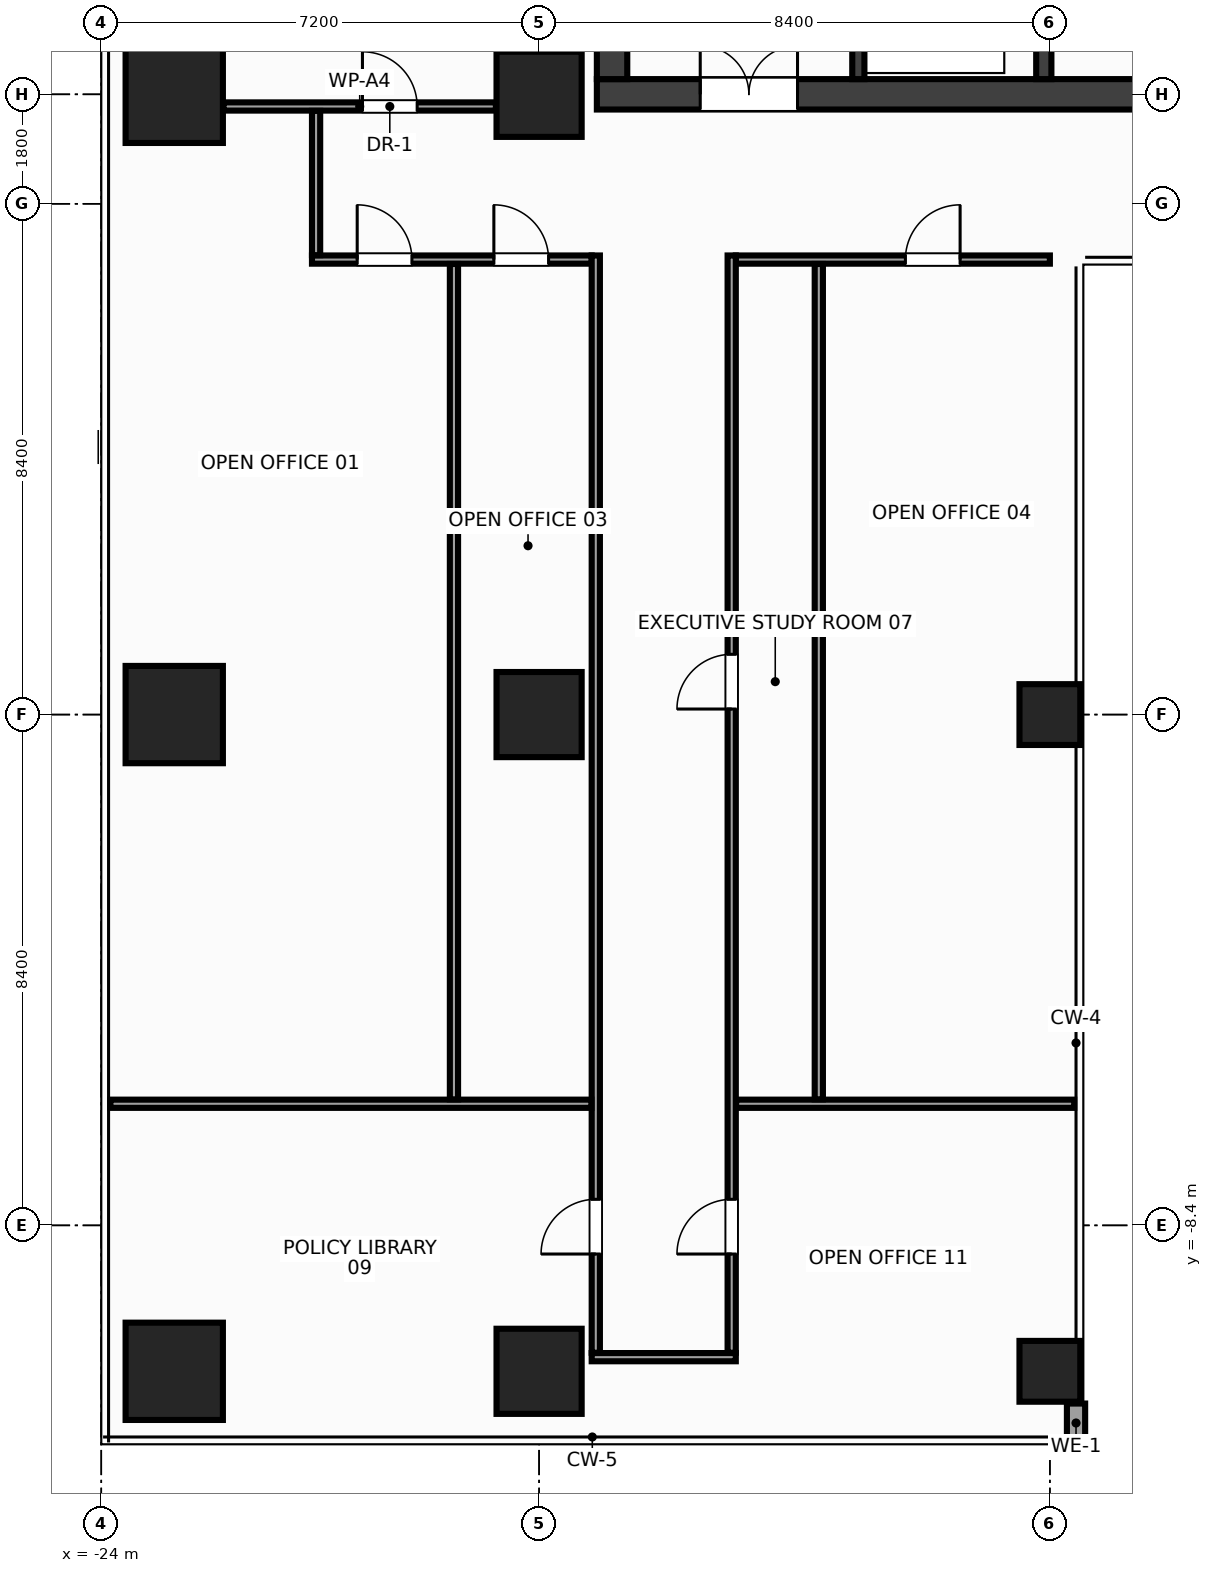
"""IFC4 building model, lengths in metres.
Left out: names, types, materials, properties, quantities, classifications, styles, units other than length and angle.
Written with IfcOpenShell. Run it as: python <this file> out.ifc"""

import sys

from ifc_helpers import new_model, si_unit, direction, frame, frame_2d, origin, origin_2d, place, context, subcontext, project, spatial, rectangle, hollow_rectangle, extrude, source, transform, mapped, element, fill, save


model = new_model("IFC4")
c1 = context("Model", 3, precision=1e-05, world=origin(), true_north=direction((0.0, 1.0)))
c2 = subcontext(c1, "Body", "Model", "MODEL_VIEW")
j1 = project(units=[si_unit("LENGTHUNIT", "METRE"), si_unit("PLANEANGLEUNIT", "RADIAN")], contexts=[c1])
p1 = place(None, origin())
s1 = spatial("IfcSite", under=j1, at=p1, CompositionType="ELEMENT")
p2 = place(p1, origin())
s2 = spatial("IfcBuilding", under=s1, at=p2, CompositionType="ELEMENT")
p3 = place(p2, frame((0.0, 0.0, 203.6)))
s3 = spatial("IfcBuildingStorey", under=s2, at=p3, CompositionType="ELEMENT", Elevation=203.6)
m1 = source(origin(), c2, "Body", "SweptSolid", [
    extrude(rectangle(XDim=31.7, YDim=0.5, at=frame_2d((15.85, 0.0))), origin(), (0.0, 0.0, 1.0), 3.6),
])
p4 = place(p3, frame((-15.85, 10.2, 0.0), z_axis=(0.0, 0.0, 1.0), x_axis=(1.0, 0.0, 0.0)))
e1 = element("IfcWall", 1, at=p4, inside=s3, PredefinedType="SHEAR", context=c2, shape_type="MappedRepresentation", body=[
    mapped(m1, transform((0.0, 0.0, 0.0), x_axis=(1.0, 0.0, 0.0), y_axis=(0.0, 1.0, 0.0), z_axis=(0.0, 0.0, 1.0), scale=1.0)),
])
p5 = place(p4, frame((1.7, 0.0, 0.0)))
e2 = element("IfcOpeningElement", 2, at=p5, cuts=e1, PredefinedType="OPENING", context=c2, shape_type="SweptSolid", body=[
    extrude(rectangle(XDim=1.6, YDim=2.15, at=frame_2d((0.8, 1.075))), frame((0.0, 0.262, 0.0), z_axis=(0.0, -1.0, 0.0), x_axis=(1.0, 0.0, 0.0)), (0.0, 0.0, 1.0), 0.524),
])
p6 = place(p4, frame((28.4, 0.0, 0.0)))
e3 = element("IfcOpeningElement", 3, at=p6, cuts=e1, PredefinedType="OPENING", context=c2, shape_type="SweptSolid", body=[
    extrude(rectangle(XDim=1.6, YDim=2.15, at=frame_2d((0.8, 1.075))), frame((0.0, 0.262, 0.0), z_axis=(0.0, -1.0, 0.0), x_axis=(1.0, 0.0, 0.0)), (0.0, 0.0, 1.0), 0.524),
])
p7 = place(p4, frame((15.1, 0.0, 0.0)))
e4 = element("IfcOpeningElement", 4, at=p7, cuts=e1, PredefinedType="OPENING", context=c2, shape_type="SweptSolid", body=[
    extrude(rectangle(XDim=1.5, YDim=2.2, at=frame_2d((0.75, 1.1))), frame((0.0, 0.262, 0.0), z_axis=(0.0, -1.0, 0.0), x_axis=(1.0, 0.0, 0.0)), (0.0, 0.0, 1.0), 0.524),
])
m2 = source(origin(), c2, "Body", "SweptSolid", [
    extrude(rectangle(XDim=13.1, YDim=0.5, at=frame_2d((6.55, 0.0))), origin(), (0.0, 0.0, 1.0), 3.6),
])
p8 = place(p3, frame((-15.6, 10.45, 0.0), z_axis=(0.0, 0.0, 1.0), x_axis=(0.0, 1.0, 0.0)))
e5 = element("IfcWall", 5, at=p8, inside=s3, PredefinedType="SHEAR", context=c2, shape_type="MappedRepresentation", body=[
    mapped(m2, transform((0.0, 0.0, 0.0), x_axis=(1.0, 0.0, 0.0), y_axis=(0.0, 1.0, 0.0), z_axis=(0.0, 0.0, 1.0), scale=1.0)),
])
m3 = source(origin(), c2, "Body", "SweptSolid", [
    extrude(rectangle(XDim=13.1, YDim=0.25, at=frame_2d((6.55, 0.0))), origin(), (0.0, 0.0, 1.0), 3.6),
])
p9 = place(p3, frame((-8.5, 10.45, 0.0), z_axis=(0.0, 0.0, 1.0), x_axis=(0.0, 1.0, 0.0)))
e6 = element("IfcWall", 6, at=p9, inside=s3, PredefinedType="SHEAR", context=c2, shape_type="MappedRepresentation", body=[
    mapped(m3, transform((0.0, 0.0, 0.0), x_axis=(1.0, 0.0, 0.0), y_axis=(0.0, 1.0, 0.0), z_axis=(0.0, 0.0, 1.0), scale=1.0)),
])
p10 = place(p9, frame((4.22, 0.0, 0.0)))
e7 = element("IfcOpeningElement", 7, at=p10, cuts=e6, PredefinedType="OPENING", context=c2, shape_type="SweptSolid", body=[
    extrude(rectangle(XDim=1.1, YDim=2.15, at=frame_2d((0.55, 1.075))), frame((0.0, 0.137, 0.0), z_axis=(0.0, -1.0, 0.0), x_axis=(1.0, 0.0, 0.0)), (0.0, 0.0, 1.0), 0.274),
])
p11 = place(p9, frame((6.14, 0.0, 0.0)))
e8 = element("IfcOpeningElement", 8, at=p11, cuts=e6, PredefinedType="OPENING", context=c2, shape_type="SweptSolid", body=[
    extrude(rectangle(XDim=1.1, YDim=2.15, at=frame_2d((0.55, 1.075))), frame((0.0, 0.137, 0.0), z_axis=(0.0, -1.0, 0.0), x_axis=(1.0, 0.0, 0.0)), (0.0, 0.0, 1.0), 0.274),
])
p12 = place(p9, frame((8.06, 0.0, 0.0)))
e9 = element("IfcOpeningElement", 9, at=p12, cuts=e6, PredefinedType="OPENING", context=c2, shape_type="SweptSolid", body=[
    extrude(rectangle(XDim=1.1, YDim=2.15, at=frame_2d((0.55, 1.075))), frame((0.0, 0.137, 0.0), z_axis=(0.0, -1.0, 0.0), x_axis=(1.0, 0.0, 0.0)), (0.0, 0.0, 1.0), 0.274),
])
m4 = source(origin(), c2, "Body", "SweptSolid", [
    extrude(rectangle(XDim=3.2, YDim=0.2, at=frame_2d((1.6, 0.0))), origin(), (0.0, 0.0, 1.0), 3.6),
])
p13 = place(p3, frame((-11.55, 10.45, 0.0), z_axis=(0.0, 0.0, 1.0), x_axis=(0.0, 1.0, 0.0)))
e10 = element("IfcWall", 10, at=p13, inside=s3, PredefinedType="SHEAR", context=c2, shape_type="MappedRepresentation", body=[
    mapped(m4, transform((0.0, 0.0, 0.0), x_axis=(1.0, 0.0, 0.0), y_axis=(0.0, 1.0, 0.0), z_axis=(0.0, 0.0, 1.0), scale=1.0)),
])
p14 = place(p13, frame((0.9, 0.0, 0.0)))
e11 = element("IfcOpeningElement", 11, at=p14, cuts=e10, PredefinedType="OPENING", context=c2, shape_type="SweptSolid", body=[
    extrude(rectangle(XDim=1.1, YDim=2.15, at=frame_2d((0.55, 1.075))), frame((0.0, 0.112, 0.0), z_axis=(0.0, -1.0, 0.0), x_axis=(1.0, 0.0, 0.0)), (0.0, 0.0, 1.0), 0.224),
])
m5 = source(origin(), c2, "Body", "SweptSolid", [
    extrude(rectangle(XDim=1.4, YDim=1.4, at=origin_2d()), origin(), (0.0, 0.0, 1.0), 3.6),
])
for number, where, z_axis, x_axis in (
    (12, (-16.8, -10.8, 0.0), (0.0, 0.0, 1.0), (1.0, 0.0, 0.0)),
    (13, (-16.8, 0.0, 0.0), (0.0, 0.0, 1.0), (1.0, 0.0, 0.0)),
    (14, (-16.8, 10.2, 0.0), (0.0, 0.0, 1.0), (1.0, 0.0, 0.0)),
):
    element("IfcColumn", number, at=place(p3, frame(where, z_axis=z_axis, x_axis=x_axis)), inside=s3, PredefinedType="COLUMN", context=c2, shape_type="MappedRepresentation", body=[
        mapped(m5, transform((0.0, 0.0, 0.0), x_axis=(1.0, 0.0, 0.0), y_axis=(0.0, 1.0, 0.0), z_axis=(0.0, 0.0, 1.0), scale=1.0)),
    ])
m6 = source(origin(), c2, "Body", "SweptSolid", [
    extrude(rectangle(XDim=1.6, YDim=1.6, at=origin_2d()), origin(), (0.0, 0.0, 1.0), 3.6),
])
for number, where, z_axis, x_axis in (
    (15, (-22.8, -10.8, 0.0), (0.0, 0.0, 1.0), (1.0, 0.0, 0.0)),
    (16, (-22.8, 0.0, 0.0), (0.0, 0.0, 1.0), (1.0, 0.0, 0.0)),
    (17, (-22.8, 10.2, 0.0), (0.0, 0.0, 1.0), (1.0, 0.0, 0.0)),
):
    element("IfcColumn", number, at=place(p3, frame(where, z_axis=z_axis, x_axis=x_axis)), inside=s3, PredefinedType="COLUMN", context=c2, shape_type="MappedRepresentation", body=[
        mapped(m6, transform((0.0, 0.0, 0.0), x_axis=(1.0, 0.0, 0.0), y_axis=(0.0, 1.0, 0.0), z_axis=(0.0, 0.0, 1.0), scale=1.0)),
    ])
m7 = source(origin(), c2, "Body", "SweptSolid", [
    extrude(hollow_rectangle(XDim=1.0, YDim=1.0, WallThickness=0.045, at=origin_2d()), origin(), (0.0, 0.0, 1.0), 3.6),
])
for number, where, z_axis, x_axis in (
    (18, (-8.4, 0.0, 0.0), (0.0, 0.0, 1.0), (1.0, 0.0, 0.0)),
    (19, (-8.4, -10.8, 0.0), (0.0, 0.0, 1.0), (1.0, 0.0, 0.0)),
):
    element("IfcColumn", number, at=place(p3, frame(where, z_axis=z_axis, x_axis=x_axis)), inside=s3, PredefinedType="COLUMN", context=c2, shape_type="MappedRepresentation", body=[
        mapped(m7, transform((0.0, 0.0, 0.0), x_axis=(1.0, 0.0, 0.0), y_axis=(0.0, 1.0, 0.0), z_axis=(0.0, 0.0, 1.0), scale=1.0)),
    ])
m8 = source(origin(), c2, "Body", "SweptSolid", [
    extrude(rectangle(XDim=0.64, YDim=0.24, at=frame_2d((0.32, 0.0))), origin(), (0.0, 0.0, 1.0), 2.76),
])
p15 = place(p3, frame((-7.97, -11.97, 0.0), z_axis=(0.0, 0.0, 1.0), x_axis=(0.0, 1.0, 0.0)))
e20 = element("IfcWall", 20, at=p15, inside=s3, PredefinedType="STANDARD", context=c2, shape_type="MappedRepresentation", body=[
    mapped(m8, transform((0.0, 0.0, 0.0), x_axis=(1.0, 0.0, 0.0), y_axis=(0.0, 1.0, 0.0), z_axis=(0.0, 0.0, 1.0), scale=1.0)),
])
m9 = source(origin(), c2, "Body", "SweptSolid", [
    extrude(rectangle(XDim=4.48, YDim=0.135, at=frame_2d((2.24, 0.0))), origin(), (0.0, 0.0, 1.0), 2.915),
])
p16 = place(p3, frame((-21.99, 10.0, 0.0), z_axis=(0.0, 0.0, 1.0), x_axis=(1.0, 0.0, 0.0)))
e21 = element("IfcWall", 21, at=p16, inside=s3, PredefinedType="PARTITIONING", context=c2, shape_type="MappedRepresentation", body=[
    mapped(m9, transform((0.0, 0.0, 0.0), x_axis=(1.0, 0.0, 0.0), y_axis=(0.0, 1.0, 0.0), z_axis=(0.0, 0.0, 1.0), scale=1.0)),
])
p17 = place(p16, frame((2.285, 0.0, 0.0)))
e22 = element("IfcOpeningElement", 22, at=p17, cuts=e21, PredefinedType="OPENING", context=c2, shape_type="SweptSolid", body=[
    extrude(rectangle(XDim=0.9, YDim=2.15, at=frame_2d((0.45, 1.075))), frame((0.0, 0.08, 0.0), z_axis=(0.0, -1.0, 0.0), x_axis=(1.0, 0.0, 0.0)), (0.0, 0.0, 1.0), 0.159),
])
m10 = source(origin(), c2, "Body", "SweptSolid", [
    extrude(rectangle(XDim=4.6, YDim=0.135, at=frame_2d((2.3, 0.0))), origin(), (0.0, 0.0, 1.0), 2.765),
])
p18 = place(p3, frame((-20.535, 7.482, 0.0), z_axis=(0.0, 0.0, 1.0), x_axis=(1.0, 0.0, 0.0)))
e23 = element("IfcWall", 23, at=p18, inside=s3, PredefinedType="PARTITIONING", context=c2, shape_type="MappedRepresentation", body=[
    mapped(m10, transform((0.0, 0.0, 0.0), x_axis=(1.0, 0.0, 0.0), y_axis=(0.0, 1.0, 0.0), z_axis=(0.0, 0.0, 1.0), scale=1.0)),
])
p19 = place(p18, frame((0.744, 0.0, 0.0)))
e24 = element("IfcOpeningElement", 24, at=p19, cuts=e23, PredefinedType="OPENING", context=c2, shape_type="SweptSolid", body=[
    extrude(rectangle(XDim=0.9, YDim=2.15, at=frame_2d((0.45, 1.075))), frame((0.0, 0.08, 0.0), z_axis=(0.0, -1.0, 0.0), x_axis=(1.0, 0.0, 0.0)), (0.0, 0.0, 1.0), 0.159),
])
p20 = place(p18, frame((2.991, 0.0, 0.0)))
e25 = element("IfcOpeningElement", 25, at=p20, cuts=e23, PredefinedType="OPENING", context=c2, shape_type="SweptSolid", body=[
    extrude(rectangle(XDim=0.9, YDim=2.15, at=frame_2d((0.45, 1.075))), frame((0.0, 0.08, 0.0), z_axis=(0.0, -1.0, 0.0), x_axis=(1.0, 0.0, 0.0)), (0.0, 0.0, 1.0), 0.159),
])
m11 = source(origin(), c2, "Body", "SweptSolid", [
    extrude(rectangle(XDim=5.165, YDim=0.135, at=frame_2d((2.583, 0.0))), origin(), (0.0, 0.0, 1.0), 3.38),
])
p21 = place(p3, frame((-13.565, 7.482, 0.0), z_axis=(0.0, 0.0, 1.0), x_axis=(1.0, 0.0, 0.0)))
e26 = element("IfcWall", 26, at=p21, inside=s3, PredefinedType="PARTITIONING", context=c2, shape_type="MappedRepresentation", body=[
    mapped(m11, transform((0.0, 0.0, 0.0), x_axis=(1.0, 0.0, 0.0), y_axis=(0.0, 1.0, 0.0), z_axis=(0.0, 0.0, 1.0), scale=1.0)),
])
p22 = place(p21, frame((2.789, 0.0, 0.0)))
e27 = element("IfcOpeningElement", 27, at=p22, cuts=e26, PredefinedType="OPENING", context=c2, shape_type="SweptSolid", body=[
    extrude(rectangle(XDim=0.9, YDim=2.15, at=frame_2d((0.45, 1.075))), frame((0.0, 0.08, 0.0), z_axis=(0.0, -1.0, 0.0), x_axis=(1.0, 0.0, 0.0)), (0.0, 0.0, 1.0), 0.159),
])
m12 = source(origin(), c2, "Body", "SweptSolid", [
    extrude(rectangle(XDim=2.37, YDim=0.135, at=frame_2d((1.185, 0.0))), origin(), (0.0, 0.0, 1.0), 3.38),
])
p23 = place(p3, frame((-15.935, -10.567, 0.0), z_axis=(0.0, 0.0, 1.0), x_axis=(1.0, 0.0, 0.0)))
e28 = element("IfcWall", 28, at=p23, inside=s3, PredefinedType="PARTITIONING", context=c2, shape_type="MappedRepresentation", body=[
    mapped(m12, transform((0.0, 0.0, 0.0), x_axis=(1.0, 0.0, 0.0), y_axis=(0.0, 1.0, 0.0), z_axis=(0.0, 0.0, 1.0), scale=1.0)),
])
m13 = source(origin(), c2, "Body", "SweptSolid", [
    extrude(rectangle(XDim=2.373, YDim=0.135, at=frame_2d((1.186, 0.0))), origin(), (0.0, 0.0, 1.0), 3.38),
])
p24 = place(p3, frame((-20.468, 7.555, 0.0), z_axis=(0.0, 0.0, 1.0), x_axis=(0.0, 1.0, 0.0)))
e29 = element("IfcWall", 29, at=p24, inside=s3, PredefinedType="PARTITIONING", context=c2, shape_type="MappedRepresentation", body=[
    mapped(m13, transform((0.0, 0.0, 0.0), x_axis=(1.0, 0.0, 0.0), y_axis=(0.0, 1.0, 0.0), z_axis=(0.0, 0.0, 1.0), scale=1.0)),
])
m14 = source(origin(), c2, "Body", "SweptSolid", [
    extrude(rectangle(XDim=18.045, YDim=0.135, at=frame_2d((9.022, 0.0))), origin(), (0.0, 0.0, 1.0), 2.915),
])
p25 = place(p3, frame((-15.867, -10.495, 0.0), z_axis=(0.0, 0.0, 1.0), x_axis=(0.0, 1.0, 0.0)))
e30 = element("IfcWall", 30, at=p25, inside=s3, PredefinedType="PARTITIONING", context=c2, shape_type="MappedRepresentation", body=[
    mapped(m14, transform((0.0, 0.0, 0.0), x_axis=(1.0, 0.0, 0.0), y_axis=(0.0, 1.0, 0.0), z_axis=(0.0, 0.0, 1.0), scale=1.0)),
])
p26 = place(p25, frame((1.624, 0.0, 0.0)))
e31 = element("IfcOpeningElement", 31, at=p26, cuts=e30, PredefinedType="OPENING", context=c2, shape_type="SweptSolid", body=[
    extrude(rectangle(XDim=0.9, YDim=2.15, at=frame_2d((0.45, 1.075))), frame((0.0, 0.08, 0.0), z_axis=(0.0, -1.0, 0.0), x_axis=(1.0, 0.0, 0.0)), (0.0, 0.0, 1.0), 0.159),
])
p27 = place(p3, frame((-13.633, -10.495, 0.0), z_axis=(0.0, 0.0, 1.0), x_axis=(0.0, 1.0, 0.0)))
e32 = element("IfcWall", 32, at=p27, inside=s3, PredefinedType="PARTITIONING", context=c2, shape_type="MappedRepresentation", body=[
    mapped(m14, transform((0.0, 0.0, 0.0), x_axis=(1.0, 0.0, 0.0), y_axis=(0.0, 1.0, 0.0), z_axis=(0.0, 0.0, 1.0), scale=1.0)),
])
p28 = place(p27, frame((10.586, 0.0, 0.0)))
e33 = element("IfcOpeningElement", 33, at=p28, cuts=e32, PredefinedType="OPENING", context=c2, shape_type="SweptSolid", body=[
    extrude(rectangle(XDim=0.9, YDim=2.15, at=frame_2d((0.45, 1.075))), frame((0.0, 0.08, 0.0), z_axis=(0.0, -1.0, 0.0), x_axis=(1.0, 0.0, 0.0)), (0.0, 0.0, 1.0), 0.159),
])
p29 = place(p27, frame((1.624, 0.0, 0.0)))
e34 = element("IfcOpeningElement", 34, at=p29, cuts=e32, PredefinedType="OPENING", context=c2, shape_type="SweptSolid", body=[
    extrude(rectangle(XDim=0.9, YDim=2.15, at=frame_2d((0.45, 1.075))), frame((0.0, 0.08, 0.0), z_axis=(0.0, -1.0, 0.0), x_axis=(1.0, 0.0, 0.0)), (0.0, 0.0, 1.0), 0.159),
])
m15 = source(origin(), c2, "Body", "SweptSolid", [
    extrude(rectangle(XDim=7.91, YDim=0.135, at=frame_2d((3.955, 0.0))), origin(), (0.0, 0.0, 1.0), 2.765),
])
p30 = place(p3, frame((-23.85, -6.4, 0.0), z_axis=(0.0, 0.0, 1.0), x_axis=(1.0, 0.0, 0.0)))
e35 = element("IfcWall", 35, at=p30, inside=s3, PredefinedType="PARTITIONING", context=c2, shape_type="MappedRepresentation", body=[
    mapped(m15, transform((0.0, 0.0, 0.0), x_axis=(1.0, 0.0, 0.0), y_axis=(0.0, 1.0, 0.0), z_axis=(0.0, 0.0, 1.0), scale=1.0)),
])
m16 = source(origin(), c2, "Body", "SweptSolid", [
    extrude(rectangle(XDim=5.56, YDim=0.135, at=frame_2d((2.78, 0.0))), origin(), (0.0, 0.0, 1.0), 2.765),
])
p31 = place(p3, frame((-13.56, -6.4, 0.0), z_axis=(0.0, 0.0, 1.0), x_axis=(1.0, 0.0, 0.0)))
e36 = element("IfcWall", 36, at=p31, inside=s3, PredefinedType="PARTITIONING", context=c2, shape_type="MappedRepresentation", body=[
    mapped(m16, transform((0.0, 0.0, 0.0), x_axis=(1.0, 0.0, 0.0), y_axis=(0.0, 1.0, 0.0), z_axis=(0.0, 0.0, 1.0), scale=1.0)),
])
m17 = source(origin(), c2, "Body", "SweptSolid", [
    extrude(rectangle(XDim=13.737, YDim=0.135, at=frame_2d((6.869, 0.0))), origin(), (0.0, 0.0, 1.0), 2.915),
])
for number, where, z_axis, x_axis in (
    (37, (-18.2, -6.327, 0.0), (0.0, 0.0, 1.0), (0.0, 1.0, 0.0)),
    (38, (-12.2, -6.327, 0.0), (0.0, 0.0, 1.0), (0.0, 1.0, 0.0)),
):
    element("IfcWall", number, at=place(p3, frame(where, z_axis=z_axis, x_axis=x_axis)), inside=s3, PredefinedType="PARTITIONING", context=c2, shape_type="MappedRepresentation", body=[
        mapped(m17, transform((0.0, 0.0, 0.0), x_axis=(1.0, 0.0, 0.0), y_axis=(0.0, 1.0, 0.0), z_axis=(0.0, 0.0, 1.0), scale=1.0)),
    ])
m18 = source(origin(), c2, "Body", "SweptSolid", [
    extrude(rectangle(XDim=1.6, YDim=2.15, at=frame_2d((0.8, 1.075))), frame((0.0, 0.025, 0.0), z_axis=(0.0, -1.0, 0.0), x_axis=(1.0, 0.0, 0.0)), (0.0, 0.0, 1.0), 0.05),
])
p32 = place(p5, origin())
e39 = element("IfcDoor", 39, at=p32, inside=s3, OperationType="DOUBLE_DOOR_SINGLE_SWING", PredefinedType="DOOR", context=c2, shape_type="MappedRepresentation", body=[
    mapped(m18, transform((0.0, 0.0, 0.0), x_axis=(1.0, 0.0, 0.0), y_axis=(0.0, 1.0, 0.0), z_axis=(0.0, 0.0, 1.0), scale=1.0)),
])
fill(e2, e39)
m19 = source(origin(), c2, "Body", "SweptSolid", [
    extrude(rectangle(XDim=0.9, YDim=2.15, at=frame_2d((0.45, 1.075))), frame((0.0, 0.025, 0.0), z_axis=(0.0, -1.0, 0.0), x_axis=(1.0, 0.0, 0.0)), (0.0, 0.0, 1.0), 0.05),
])
p33 = place(p17, origin())
e40 = element("IfcDoor", 40, at=p33, inside=s3, OperationType="SINGLE_SWING_LEFT", PredefinedType="DOOR", context=c2, shape_type="MappedRepresentation", body=[
    mapped(m19, transform((0.0, 0.0, 0.0), x_axis=(1.0, 0.0, 0.0), y_axis=(0.0, 1.0, 0.0), z_axis=(0.0, 0.0, 1.0), scale=1.0)),
])
fill(e22, e40)
p34 = place(p19, origin())
e41 = element("IfcDoor", 41, at=p34, inside=s3, OperationType="SINGLE_SWING_LEFT", PredefinedType="DOOR", context=c2, shape_type="MappedRepresentation", body=[
    mapped(m19, transform((0.0, 0.0, 0.0), x_axis=(1.0, 0.0, 0.0), y_axis=(0.0, 1.0, 0.0), z_axis=(0.0, 0.0, 1.0), scale=1.0)),
])
fill(e24, e41)
p35 = place(p20, origin())
e42 = element("IfcDoor", 42, at=p35, inside=s3, OperationType="SINGLE_SWING_LEFT", PredefinedType="DOOR", context=c2, shape_type="MappedRepresentation", body=[
    mapped(m19, transform((0.0, 0.0, 0.0), x_axis=(1.0, 0.0, 0.0), y_axis=(0.0, 1.0, 0.0), z_axis=(0.0, 0.0, 1.0), scale=1.0)),
])
fill(e25, e42)
p36 = place(p22, origin())
e43 = element("IfcDoor", 43, at=p36, inside=s3, OperationType="SINGLE_SWING_RIGHT", PredefinedType="DOOR", context=c2, shape_type="MappedRepresentation", body=[
    mapped(m19, transform((0.0, 0.0, 0.0), x_axis=(1.0, 0.0, 0.0), y_axis=(0.0, 1.0, 0.0), z_axis=(0.0, 0.0, 1.0), scale=1.0)),
])
fill(e27, e43)
p37 = place(p28, origin())
e44 = element("IfcDoor", 44, at=p37, inside=s3, OperationType="SINGLE_SWING_LEFT", PredefinedType="DOOR", context=c2, shape_type="MappedRepresentation", body=[
    mapped(m19, transform((0.0, 0.0, 0.0), x_axis=(1.0, 0.0, 0.0), y_axis=(0.0, 1.0, 0.0), z_axis=(0.0, 0.0, 1.0), scale=1.0)),
])
fill(e33, e44)
p38 = place(p26, origin())
e45 = element("IfcDoor", 45, at=p38, inside=s3, OperationType="SINGLE_SWING_LEFT", PredefinedType="DOOR", context=c2, shape_type="MappedRepresentation", body=[
    mapped(m19, transform((0.0, 0.0, 0.0), x_axis=(1.0, 0.0, 0.0), y_axis=(0.0, 1.0, 0.0), z_axis=(0.0, 0.0, 1.0), scale=1.0)),
])
fill(e31, e45)
p39 = place(p29, origin())
e46 = element("IfcDoor", 46, at=p39, inside=s3, OperationType="SINGLE_SWING_LEFT", PredefinedType="DOOR", context=c2, shape_type="MappedRepresentation", body=[
    mapped(m19, transform((0.0, 0.0, 0.0), x_axis=(1.0, 0.0, 0.0), y_axis=(0.0, 1.0, 0.0), z_axis=(0.0, 0.0, 1.0), scale=1.0)),
])
fill(e34, e46)
save(model, sys.argv[1])
